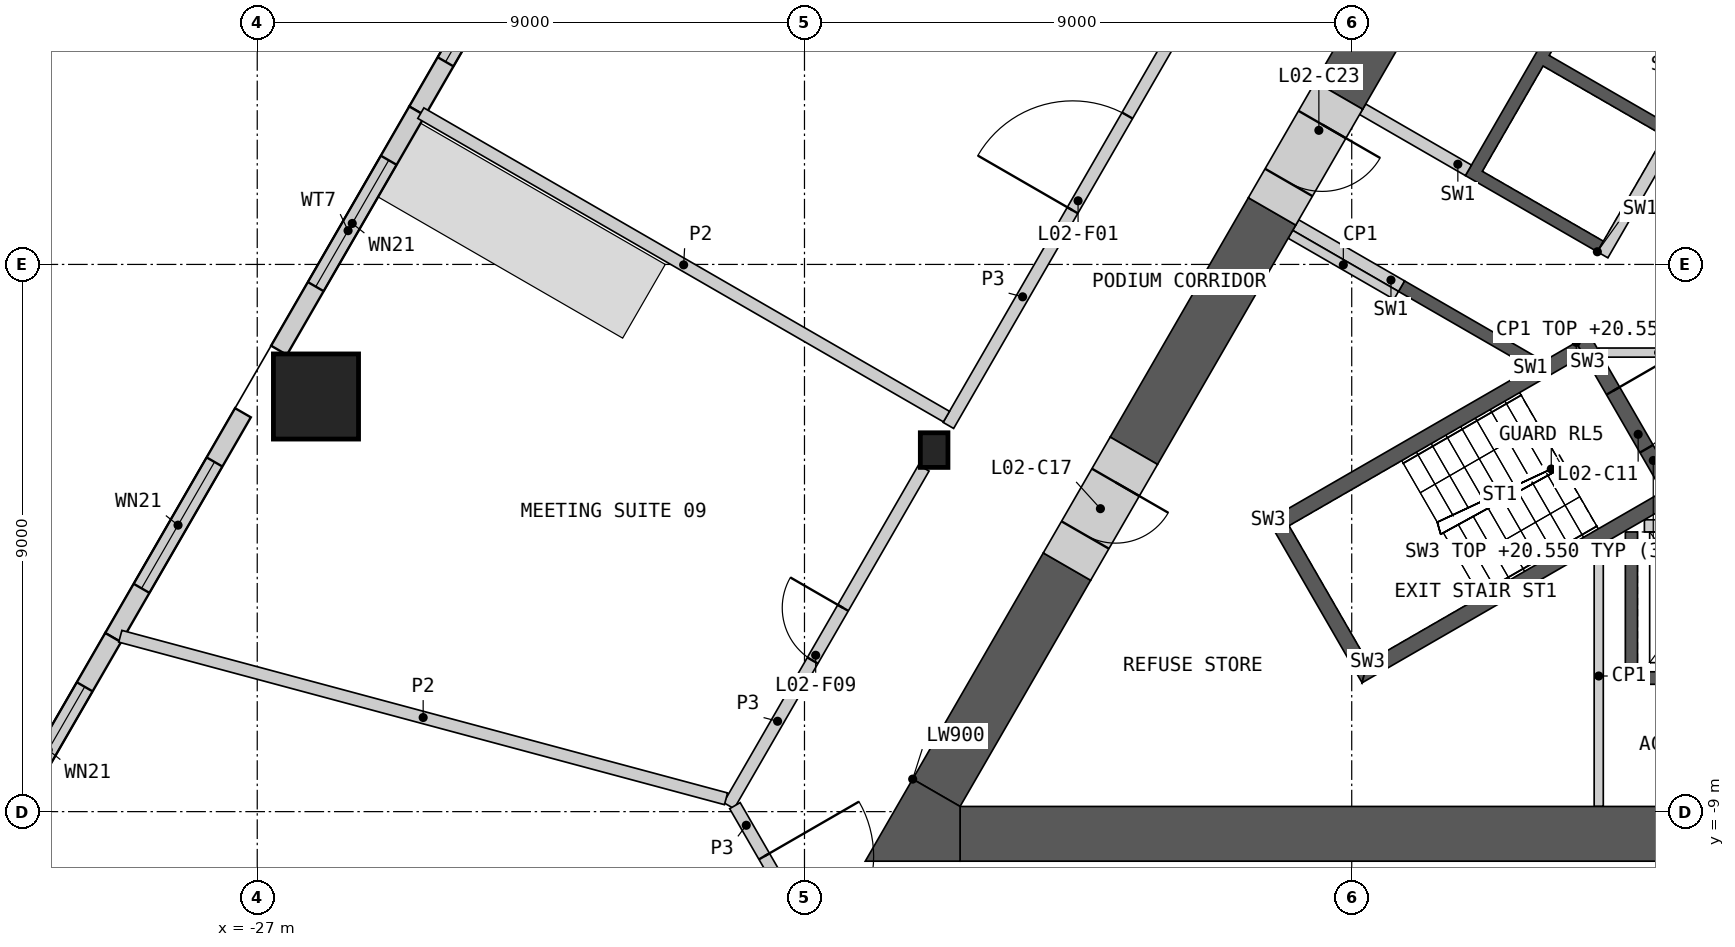
"""IFC4 building model, lengths in metres.
Left out: names, types, materials, properties, quantities, classifications, styles, units other than length and angle.
Written with IfcOpenShell. Run it as: python <this file> out.ifc"""

import sys

from ifc_helpers import new_model, si_unit, direction, frame, frame_2d, origin, origin_2d, place, context, subcontext, project, spatial, polyline, rectangle, hollow_rectangle, i_section, outline, extrude, element, fill, save


model = new_model("IFC4")
c1 = context("Model", 3, precision=1e-05, world=origin(), true_north=direction((0.0, 1.0)))
c2 = subcontext(c1, "Body", "Model", "MODEL_VIEW")
j1 = project(units=[si_unit("LENGTHUNIT", "METRE"), si_unit("PLANEANGLEUNIT", "RADIAN")], contexts=[c1])
p1 = place(None, origin())
s1 = spatial("IfcSite", under=j1, at=p1, CompositionType="ELEMENT")
p2 = place(p1, origin())
s2 = spatial("IfcBuilding", under=s1, at=p2, CompositionType="ELEMENT")
p3 = place(p2, frame((0.0, 0.0, 15.5)))
s3 = spatial("IfcBuildingStorey", under=s2, at=p3, CompositionType="ELEMENT", Elevation=15.5)
p4 = place(p3, frame((-26.034, -2.172, 0.0), z_axis=(0.0, 0.0, 1.0), x_axis=(1.0, 0.0, 0.0)))
e1 = element("IfcColumn", 1, at=p4, inside=s3, PredefinedType="COLUMN", context=c2, shape_type="SweptSolid", body=[
    extrude(hollow_rectangle(XDim=1.4, YDim=1.4, WallThickness=0.1, at=origin_2d()), origin(), (0.0, 0.0, 1.0), 5.5),
])
p5 = place(p3, frame((-15.868, -3.054, 0.0), z_axis=(0.0, 0.0, 1.0), x_axis=(1.0, 0.0, 0.0)))
e2 = element("IfcColumn", 2, at=p5, inside=s3, PredefinedType="COLUMN", context=c2, shape_type="SweptSolid", body=[
    extrude(i_section(OverallWidth=0.454, OverallDepth=0.57, WebThickness=0.078, FlangeThickness=0.125, at=origin_2d()), origin(), (0.0, 0.0, 1.0), 5.5),
])
p6 = place(p3, frame((-22.235, 6.221, 0.0), z_axis=(0.0, 0.0, 1.0), x_axis=(-0.500019418418, -0.866014192265, 0.0)))
e3 = element("IfcWall", 3, at=p6, inside=s3, PredefinedType="SOLIDWALL", context=c2, shape_type="SweptSolid", body=[
    extrude(rectangle(XDim=4.27, YDim=0.3, at=frame_2d((2.135, 0.0))), origin(), (0.0, 0.0, 1.0), 5.05),
])
p7 = place(p6, frame((0.935, 0.0, 0.9)))
e4 = element("IfcOpeningElement", 4, at=p7, cuts=e3, PredefinedType="OPENING", context=c2, shape_type="SweptSolid", body=[
    extrude(rectangle(XDim=2.4, YDim=3.0, at=frame_2d((1.2, 1.5))), frame((0.0, 0.16, 0.0), z_axis=(0.0, -1.0, 0.0), x_axis=(1.0, 0.0, 0.0)), (0.0, 0.0, 1.0), 0.32),
])
p8 = place(p3, frame((-24.37, 2.523, 0.0), z_axis=(0.0, 0.0, 1.0), x_axis=(-0.499964285679, -0.866046022475, 0.0)))
e5 = element("IfcWall", 5, at=p8, inside=s3, PredefinedType="SOLIDWALL", context=c2, shape_type="SweptSolid", body=[
    extrude(rectangle(XDim=4.544, YDim=0.3, at=frame_2d((2.272, 0.0))), origin(), (0.0, 0.0, 1.0), 5.05),
])
p9 = place(p8, frame((0.935, 0.0, 0.9)))
e6 = element("IfcOpeningElement", 6, at=p9, cuts=e5, PredefinedType="OPENING", context=c2, shape_type="SweptSolid", body=[
    extrude(rectangle(XDim=2.4, YDim=3.0, at=frame_2d((1.2, 1.5))), frame((0.0, 0.16, 0.0), z_axis=(0.0, -1.0, 0.0), x_axis=(1.0, 0.0, 0.0)), (0.0, 0.0, 1.0), 0.32),
])
p10 = place(p3, frame((-27.235, -2.439, 0.0), z_axis=(0.0, 0.0, 1.0), x_axis=(-0.499994660107, -0.866028486751, 0.0)))
e7 = element("IfcWall", 7, at=p10, inside=s3, PredefinedType="SOLIDWALL", context=c2, shape_type="SweptSolid", body=[
    extrude(rectangle(XDim=4.27, YDim=0.3, at=frame_2d((2.135, 0.0))), origin(), (0.0, 0.0, 1.0), 5.05),
])
p11 = place(p10, frame((0.935, 0.0, 0.9)))
e8 = element("IfcOpeningElement", 8, at=p11, cuts=e7, PredefinedType="OPENING", context=c2, shape_type="SweptSolid", body=[
    extrude(rectangle(XDim=2.4, YDim=3.0, at=frame_2d((1.2, 1.5))), frame((0.0, 0.16, 0.0), z_axis=(0.0, -1.0, 0.0), x_axis=(1.0, 0.0, 0.0)), (0.0, 0.0, 1.0), 0.32),
])
p12 = place(p3, frame((-29.37, -6.137, 0.0), z_axis=(0.0, 0.0, 1.0), x_axis=(-0.49999314502, -0.866029361473, 0.0)))
e9 = element("IfcWall", 9, at=p12, inside=s3, PredefinedType="SOLIDWALL", context=c2, shape_type="SweptSolid", body=[
    extrude(rectangle(XDim=4.476, YDim=0.3, at=frame_2d((2.238, 0.0))), origin(), (0.0, 0.0, 1.0), 5.05),
])
p13 = place(p12, frame((0.935, 0.0, 0.9)))
e10 = element("IfcOpeningElement", 10, at=p13, cuts=e9, PredefinedType="OPENING", context=c2, shape_type="SweptSolid", body=[
    extrude(rectangle(XDim=2.4, YDim=3.0, at=frame_2d((1.2, 1.5))), frame((0.0, 0.16, 0.0), z_axis=(0.0, -1.0, 0.0), x_axis=(1.0, 0.0, 0.0)), (0.0, 0.0, 1.0), 0.32),
])
p14 = place(p3, origin())
e11 = element("IfcWall", 11, at=p14, inside=s3, PredefinedType="SHEAR", context=c2, shape_type="SweptSolid", body=[
    extrude(outline(polyline([(4.5, -4.4), (4.5, -6.906), (-4.5, -6.906), (-4.5, -4.4), (-4.3, -4.4), (-4.3, -6.7), (-2.3, -6.7), (-2.3, -4.4), (-2.1, -4.4), (-2.1, -6.7), (-0.1, -6.7), (-0.1, -4.4), (0.1, -4.4), (0.1, -6.7), (2.1, -6.7), (2.1, -4.4), (2.3, -4.4), (2.3, -6.7), (4.3, -6.7), (4.3, -4.4), (4.5, -4.4)])), origin(), (0.0, 0.0, 1.0), 5.05),
])
p15 = place(p3, frame((-4.187, -4.3, 0.0), z_axis=(0.0, 0.0, 1.0), x_axis=(1.0, 0.0, 0.0)))
e12 = element("IfcWall", 12, at=p15, inside=s3, PredefinedType="SOLIDWALL", context=c2, shape_type="SweptSolid", body=[
    extrude(rectangle(XDim=8.373, YDim=0.2, at=frame_2d((4.187, 0.0))), origin(), (0.0, 0.0, 1.0), 5.05),
])
p16 = place(p15, frame((0.287, 0.0, 0.0)))
e13 = element("IfcOpeningElement", 13, at=p16, cuts=e12, PredefinedType="OPENING", context=c2, shape_type="SweptSolid", body=[
    extrude(rectangle(XDim=1.2, YDim=2.1, at=frame_2d((0.6, 1.05))), frame((0.0, 0.11, 0.0), z_axis=(0.0, -1.0, 0.0), x_axis=(1.0, 0.0, 0.0)), (0.0, 0.0, 1.0), 0.22),
])
p17 = place(p15, frame((2.387, 0.0, 0.0)))
e14 = element("IfcOpeningElement", 14, at=p17, cuts=e12, PredefinedType="OPENING", context=c2, shape_type="SweptSolid", body=[
    extrude(rectangle(XDim=1.4, YDim=2.1, at=frame_2d((0.7, 1.05))), frame((0.0, 0.11, 0.0), z_axis=(0.0, -1.0, 0.0), x_axis=(1.0, 0.0, 0.0)), (0.0, 0.0, 1.0), 0.22),
])
p18 = place(p15, frame((4.737, 0.0, 0.0)))
e15 = element("IfcOpeningElement", 15, at=p18, cuts=e12, PredefinedType="OPENING", context=c2, shape_type="SweptSolid", body=[
    extrude(rectangle(XDim=1.1, YDim=2.1, at=frame_2d((0.55, 1.05))), frame((0.0, 0.11, 0.0), z_axis=(0.0, -1.0, 0.0), x_axis=(1.0, 0.0, 0.0)), (0.0, 0.0, 1.0), 0.22),
])
p19 = place(p15, frame((6.887, 0.0, 0.0)))
e16 = element("IfcOpeningElement", 16, at=p19, cuts=e12, PredefinedType="OPENING", context=c2, shape_type="SweptSolid", body=[
    extrude(rectangle(XDim=1.2, YDim=2.1, at=frame_2d((0.6, 1.05))), frame((0.0, 0.11, 0.0), z_axis=(0.0, -1.0, 0.0), x_axis=(1.0, 0.0, 0.0)), (0.0, 0.0, 1.0), 0.22),
])
p20 = place(p3, origin())
e17 = element("IfcWall", 17, at=p20, inside=s3, PredefinedType="SHEAR", context=c2, shape_type="SweptSolid", body=[
    extrude(outline(polyline([(-6.061, -1.697), (-8.231, -0.444), (-8.131, -0.271), (-5.96, -1.524), (-6.061, -1.697)])), origin(), (0.0, 0.0, 1.0), 5.05),
])
p21 = place(p3, origin())
e18 = element("IfcWall", 18, at=p21, inside=s3, PredefinedType="SHEAR", context=c2, shape_type="SweptSolid", body=[
    extrude(outline(polyline([(-4.96, 0.208), (-7.131, 1.461), (-3.731, 7.35), (-1.561, 6.097), (-1.66, 5.924), (-3.652, 7.074), (-5.752, 3.437), (-3.76, 2.287), (-3.861, 2.113), (-5.852, 3.263), (-6.852, 1.531), (-4.861, 0.381), (-4.96, 0.208)])), origin(), (0.0, 0.0, 1.0), 5.05),
])
p22 = place(p3, frame((-1.631, 5.776, 0.0), z_axis=(0.0, 0.0, 1.0), x_axis=(-0.499992876559, -0.866029516466, 0.0)))
e19 = element("IfcWall", 19, at=p22, inside=s3, PredefinedType="SOLIDWALL", context=c2, shape_type="SweptSolid", body=[
    extrude(rectangle(XDim=6.486, YDim=0.2, at=frame_2d((3.243, 0.0))), origin(), (0.0, 0.0, 1.0), 5.05),
])
p23 = place(p22, frame((1.537, 0.0, 0.0)))
e20 = element("IfcOpeningElement", 20, at=p23, cuts=e19, PredefinedType="OPENING", context=c2, shape_type="SweptSolid", body=[
    extrude(rectangle(XDim=0.9, YDim=2.1, at=frame_2d((0.45, 1.05))), frame((0.0, 0.11, 0.0), z_axis=(0.0, -1.0, 0.0), x_axis=(1.0, 0.0, 0.0)), (0.0, 0.0, 1.0), 0.22),
])
p24 = place(p3, frame((-7.081, 1.548, 0.0), z_axis=(0.0, 0.0, 1.0), x_axis=(-0.865983199114, 0.50007309351, 0.0)))
e21 = element("IfcWall", 21, at=p24, inside=s3, PredefinedType="SHEAR", context=c2, shape_type="SweptSolid", body=[
    extrude(rectangle(XDim=2.009, YDim=0.2, at=frame_2d((1.004, 0.0))), origin(), (0.0, 0.0, 1.0), 5.05),
])
p25 = place(p3, frame((-8.181, -0.357, 0.0), z_axis=(0.0, 0.0, 1.0), x_axis=(-0.866035824272, 0.499981950752, 0.0)))
e22 = element("IfcWall", 22, at=p25, inside=s3, PredefinedType="SHEAR", context=c2, shape_type="SweptSolid", body=[
    extrude(rectangle(XDim=2.009, YDim=0.2, at=frame_2d((1.004, 0.0))), origin(), (0.0, 0.0, 1.0), 5.05),
])
p26 = place(p3, frame((-4.941, -1.45, 0.0), z_axis=(0.0, 0.0, 1.0), x_axis=(1.0, 0.0, 0.0)))
e23 = element("IfcWall", 23, at=p26, inside=s3, PredefinedType="PARTITIONING", context=c2, shape_type="SweptSolid", body=[
    extrude(rectangle(XDim=9.882, YDim=0.15, at=frame_2d((4.941, 0.0))), origin(), (0.0, 0.0, 1.0), 5.05),
])
p27 = place(p26, frame((4.391, 0.0, 0.0)))
e24 = element("IfcOpeningElement", 24, at=p27, cuts=e23, PredefinedType="OPENING", context=c2, shape_type="SweptSolid", body=[
    extrude(rectangle(XDim=1.1, YDim=2.1, at=frame_2d((0.55, 1.05))), frame((0.0, 0.085, 0.0), z_axis=(0.0, -1.0, 0.0), x_axis=(1.0, 0.0, 0.0)), (0.0, 0.0, 1.0), 0.17),
])
p28 = place(p3, origin())
e25 = element("IfcWall", 25, at=p28, inside=s3, PredefinedType="SHEAR", context=c2, shape_type="SweptSolid", body=[
    extrude(outline(polyline([(-5.307, -1.281), (-10.374, -4.206), (-10.032, -4.298), (-5.182, -1.498), (-5.307, -1.281)])), origin(), (0.0, 0.0, 1.0), 5.05),
])
p29 = place(p3, origin())
e26 = element("IfcWall", 26, at=p29, inside=s3, PredefinedType="SHEAR", context=c2, shape_type="SweptSolid", body=[
    extrude(outline(polyline([(-10.374, -4.206), (-8.83, -6.881), (-8.738, -6.539), (-10.032, -4.298), (-10.374, -4.206)])), origin(), (0.0, 0.0, 1.0), 5.05),
])
p30 = place(p3, origin())
e27 = element("IfcWall", 27, at=p30, inside=s3, PredefinedType="SHEAR", context=c2, shape_type="SweptSolid", body=[
    extrude(outline(polyline([(-8.738, -6.539), (-8.83, -6.881), (-3.763, -3.956), (-3.888, -3.739), (-8.738, -6.539)])), origin(), (0.0, 0.0, 1.0), 5.05),
])
p31 = place(p3, frame((-5.199, -1.219, 0.0), z_axis=(0.0, 0.0, 1.0), x_axis=(0.499982516597, -0.866035497597, 0.0)))
e28 = element("IfcWall", 28, at=p31, inside=s3, PredefinedType="SHEAR", context=c2, shape_type="SweptSolid", body=[
    extrude(rectangle(XDim=3.088, YDim=0.25, at=frame_2d((1.544, 0.0))), origin(), (0.0, 0.0, 1.0), 5.05),
])
p32 = place(p31, frame((0.994, 0.0, 0.0)))
e29 = element("IfcOpeningElement", 29, at=p32, cuts=e28, PredefinedType="OPENING", context=c2, shape_type="SweptSolid", body=[
    extrude(rectangle(XDim=1.1, YDim=2.1, at=frame_2d((0.55, 1.05))), frame((0.0, 0.135, 0.0), z_axis=(0.0, -1.0, 0.0), x_axis=(1.0, 0.0, 0.0)), (0.0, 0.0, 1.0), 0.27),
])
p33 = place(p3, frame((-8.268, -0.509, 0.0), z_axis=(0.0, 0.0, 1.0), x_axis=(-0.866035824272, 0.499981950752, 0.0)))
e30 = element("IfcWall", 30, at=p33, inside=s3, PredefinedType="PARTITIONING", context=c2, shape_type="SweptSolid", body=[
    extrude(rectangle(XDim=2.009, YDim=0.15, at=frame_2d((1.004, 0.0))), origin(), (0.0, 0.0, 1.0), 5.05),
])
p34 = place(p3, frame((-4.938, -8.915, 0.0), z_axis=(0.0, 0.0, 1.0), x_axis=(0.0, 1.0, 0.0)))
e31 = element("IfcWall", 31, at=p34, inside=s3, PredefinedType="PARTITIONING", context=c2, shape_type="SweptSolid", body=[
    extrude(rectangle(XDim=4.291, YDim=0.15, at=frame_2d((2.146, 0.0))), origin(), (0.0, 0.0, 1.0), 5.05),
])
p35 = place(p3, frame((-15.441, -9.365, 0.0), z_axis=(0.0, 0.0, 1.0), x_axis=(1.0, 0.0, 0.0)))
e32 = element("IfcWall", 32, at=p35, inside=s3, PredefinedType="SHEAR", context=c2, shape_type="SweptSolid", body=[
    extrude(rectangle(XDim=11.692, YDim=0.9, at=frame_2d((5.846, 0.0))), origin(), (0.0, 0.0, 1.0), 5.05),
])
p36 = place(p3, frame((-10.31, 0.872, 0.0), z_axis=(0.0, 0.0, 1.0), x_axis=(-0.499968858743, -0.866043382451, 0.0)))
e33 = element("IfcWall", 33, at=p36, inside=s3, PredefinedType="SHEAR", context=c2, shape_type="SweptSolid", body=[
    extrude(rectangle(XDim=4.546, YDim=0.9, at=frame_2d((2.273, 0.0))), origin(), (0.0, 0.0, 1.0), 5.05),
])
p37 = place(p3, frame((-13.683, -4.97, 0.0), z_axis=(0.0, 0.0, 1.0), x_axis=(-0.499996331799, -0.866027521611, 0.0)))
e34 = element("IfcWall", 34, at=p37, inside=s3, PredefinedType="SHEAR", context=c2, shape_type="SweptSolid", body=[
    extrude(rectangle(XDim=4.295, YDim=0.9, at=frame_2d((2.148, 0.0))), origin(), (0.0, 0.0, 1.0), 5.05),
])
p38 = place(p3, frame((-8.06, 4.769, 0.0), z_axis=(0.0, 0.0, 1.0), x_axis=(-0.499952165731, -0.866053019151, 0.0)))
e35 = element("IfcWall", 35, at=p38, inside=s3, PredefinedType="SHEAR", context=c2, shape_type="SweptSolid", body=[
    extrude(rectangle(XDim=2.3, YDim=0.9, at=frame_2d((1.15, 0.0))), origin(), (0.0, 0.0, 1.0), 5.05),
])
p39 = place(p3, origin())
e36 = element("IfcWall", 36, at=p39, inside=s3, PredefinedType="SHEAR", context=c2, shape_type="SweptSolid", body=[
    extrude(outline(polyline([(-16.221, -8.465), (-15.441, -8.915), (-15.441, -9.815), (-17.0, -9.815), (-16.221, -8.465)])), origin(), (0.0, 0.0, 1.0), 5.05),
])
p40 = place(p3, frame((-12.583, -3.065, 0.0), z_axis=(0.0, 0.0, 1.0), x_axis=(-0.50002983664, -0.866008176907, 0.0)))
e37 = element("IfcWall", 37, at=p40, inside=s3, PredefinedType="SHEAR", context=c2, shape_type="SweptSolid", body=[
    extrude(rectangle(XDim=2.2, YDim=0.9, at=frame_2d((1.1, 0.0))), origin(), (0.0, 0.0, 1.0), 5.05),
])
p41 = place(p40, frame((0.6, 0.0, 0.0)))
e38 = element("IfcOpeningElement", 38, at=p41, cuts=e37, PredefinedType="OPENING", context=c2, shape_type="SweptSolid", body=[
    extrude(rectangle(XDim=1.0, YDim=2.1, at=frame_2d((0.5, 1.05))), frame((0.0, 0.46, 0.0), z_axis=(0.0, -1.0, 0.0), x_axis=(1.0, 0.0, 0.0)), (0.0, 0.0, 1.0), 0.92),
])
p42 = place(p3, frame((-9.21, 2.777, 0.0), z_axis=(0.0, 0.0, 1.0), x_axis=(-0.500077893725, -0.86598042715, 0.0)))
e39 = element("IfcWall", 39, at=p42, inside=s3, PredefinedType="SHEAR", context=c2, shape_type="SweptSolid", body=[
    extrude(rectangle(XDim=2.2, YDim=0.9, at=frame_2d((1.1, 0.0))), origin(), (0.0, 0.0, 1.0), 5.05),
])
p43 = place(p42, frame((0.55, 0.0, 0.0)))
e40 = element("IfcOpeningElement", 40, at=p43, cuts=e39, PredefinedType="OPENING", context=c2, shape_type="SweptSolid", body=[
    extrude(rectangle(XDim=1.1, YDim=2.1, at=frame_2d((0.55, 1.05))), frame((0.0, 0.46, 0.0), z_axis=(0.0, -1.0, 0.0), x_axis=(1.0, 0.0, 0.0)), (0.0, 0.0, 1.0), 0.92),
])
p44 = place(p3, frame((-15.634, -2.648, 0.0), z_axis=(0.0, 0.0, 1.0), x_axis=(0.500017363087, 0.866015378969, 0.0)))
e41 = element("IfcWall", 41, at=p44, inside=s3, PredefinedType="PARTITIONING", context=c2, shape_type="SweptSolid", body=[
    extrude(rectangle(XDim=9.77, YDim=0.2, at=frame_2d((4.885, 0.0))), origin(), (0.0, 0.0, 1.0), 5.05),
])
p45 = place(p44, frame((4.086, 0.0, 0.0)))
e42 = element("IfcOpeningElement", 42, at=p45, cuts=e41, PredefinedType="OPENING", context=c2, shape_type="SweptSolid", body=[
    extrude(rectangle(XDim=1.8, YDim=2.1, at=frame_2d((0.9, 1.05))), frame((0.0, 0.11, 0.0), z_axis=(0.0, -1.0, 0.0), x_axis=(1.0, 0.0, 0.0)), (0.0, 0.0, 1.0), 0.22),
])
p46 = place(p3, frame((-19.244, -8.902, 0.0), z_axis=(0.0, 0.0, 1.0), x_axis=(0.499988314375, 0.866032150378, 0.0)))
e43 = element("IfcWall", 43, at=p46, inside=s3, PredefinedType="PARTITIONING", context=c2, shape_type="SweptSolid", body=[
    extrude(rectangle(XDim=6.412, YDim=0.2, at=frame_2d((3.206, 0.0))), origin(), (0.0, 0.0, 1.0), 5.05),
])
p47 = place(p46, frame((2.756, 0.0, 0.0)))
e44 = element("IfcOpeningElement", 44, at=p47, cuts=e43, PredefinedType="OPENING", context=c2, shape_type="SweptSolid", body=[
    extrude(rectangle(XDim=1.0, YDim=2.1, at=frame_2d((0.5, 1.05))), frame((0.0, 0.11, 0.0), z_axis=(0.0, -1.0, 0.0), x_axis=(1.0, 0.0, 0.0)), (0.0, 0.0, 1.0), 0.22),
])
p48 = place(p3, frame((-19.144, -8.902, 0.0), z_axis=(0.0, 0.0, 1.0), x_axis=(0.499958791762, -0.866049194065, 0.0)))
e45 = element("IfcWall", 45, at=p48, inside=s3, PredefinedType="PARTITIONING", context=c2, shape_type="SweptSolid", body=[
    extrude(rectangle(XDim=3.726, YDim=0.2, at=frame_2d((1.863, 0.0))), origin(), (0.0, 0.0, 1.0), 5.05),
])
p49 = place(p48, frame((0.963, 0.0, 0.0)))
e46 = element("IfcOpeningElement", 46, at=p49, cuts=e45, PredefinedType="OPENING", context=c2, shape_type="SweptSolid", body=[
    extrude(rectangle(XDim=1.8, YDim=2.1, at=frame_2d((0.9, 1.05))), frame((0.0, 0.11, 0.0), z_axis=(0.0, -1.0, 0.0), x_axis=(1.0, 0.0, 0.0)), (0.0, 0.0, 1.0), 0.22),
])
p50 = place(p3, frame((-29.252, -6.115, 0.0), z_axis=(0.0, 0.0, 1.0), x_axis=(0.965818413341, -0.259219583464, 0.0)))
e47 = element("IfcWall", 47, at=p50, inside=s3, PredefinedType="PARTITIONING", context=c2, shape_type="SweptSolid", body=[
    extrude(rectangle(XDim=10.314, YDim=0.2, at=frame_2d((5.157, 0.0))), origin(), (0.0, 0.0, 1.0), 5.05),
])
p51 = place(p3, frame((-24.31, 2.488, 0.0), z_axis=(0.0, 0.0, 1.0), x_axis=(0.866034070548, -0.499984988425, 0.0)))
e48 = element("IfcWall", 48, at=p51, inside=s3, PredefinedType="PARTITIONING", context=c2, shape_type="SweptSolid", body=[
    extrude(rectangle(XDim=9.982, YDim=0.2, at=frame_2d((4.991, 0.0))), origin(), (0.0, 0.0, 1.0), 5.05),
])
p52 = place(p7, origin())
e49 = element("IfcWindow", 49, at=p52, inside=s3, PartitioningType="SINGLE_PANEL", PredefinedType="WINDOW", context=c2, shape_type="SweptSolid", body=[
    extrude(rectangle(XDim=2.4, YDim=3.0, at=frame_2d((1.2, 1.5))), frame((0.0, 0.03, 0.0), z_axis=(0.0, -1.0, 0.0), x_axis=(1.0, 0.0, 0.0)), (0.0, 0.0, 1.0), 0.06),
])
fill(e4, e49)
p53 = place(p9, origin())
e50 = element("IfcWindow", 50, at=p53, inside=s3, PartitioningType="SINGLE_PANEL", PredefinedType="WINDOW", context=c2, shape_type="SweptSolid", body=[
    extrude(rectangle(XDim=2.4, YDim=3.0, at=frame_2d((1.2, 1.5))), frame((0.0, 0.03, 0.0), z_axis=(0.0, -1.0, 0.0), x_axis=(1.0, 0.0, 0.0)), (0.0, 0.0, 1.0), 0.06),
])
fill(e6, e50)
p54 = place(p11, origin())
e51 = element("IfcWindow", 51, at=p54, inside=s3, PartitioningType="SINGLE_PANEL", PredefinedType="WINDOW", context=c2, shape_type="SweptSolid", body=[
    extrude(rectangle(XDim=2.4, YDim=3.0, at=frame_2d((1.2, 1.5))), frame((0.0, 0.03, 0.0), z_axis=(0.0, -1.0, 0.0), x_axis=(1.0, 0.0, 0.0)), (0.0, 0.0, 1.0), 0.06),
])
fill(e8, e51)
p55 = place(p13, origin())
e52 = element("IfcWindow", 52, at=p55, inside=s3, PartitioningType="SINGLE_PANEL", PredefinedType="WINDOW", context=c2, shape_type="SweptSolid", body=[
    extrude(rectangle(XDim=2.4, YDim=3.0, at=frame_2d((1.2, 1.5))), frame((0.0, 0.03, 0.0), z_axis=(0.0, -1.0, 0.0), x_axis=(1.0, 0.0, 0.0)), (0.0, 0.0, 1.0), 0.06),
])
fill(e10, e52)
p56 = place(p32, origin())
e53 = element("IfcDoor", 53, at=p56, inside=s3, OperationType="SINGLE_SWING_LEFT", PredefinedType="DOOR", context=c2, shape_type="SweptSolid", body=[
    extrude(rectangle(XDim=1.1, YDim=2.1, at=frame_2d((0.55, 1.05))), frame((0.0, 0.025, 0.0), z_axis=(0.0, -1.0, 0.0), x_axis=(1.0, 0.0, 0.0)), (0.0, 0.0, 1.0), 0.05),
])
fill(e29, e53)
p57 = place(p41, origin())
e54 = element("IfcDoor", 54, at=p57, inside=s3, OperationType="SINGLE_SWING_LEFT", PredefinedType="DOOR", context=c2, shape_type="SweptSolid", body=[
    extrude(rectangle(XDim=1.0, YDim=2.1, at=frame_2d((0.5, 1.05))), frame((0.0, 0.205, 0.0), z_axis=(0.0, -1.0, 0.0), x_axis=(1.0, 0.0, 0.0)), (0.0, 0.0, 1.0), 0.05),
])
fill(e38, e54)
p58 = place(p43, origin())
e55 = element("IfcDoor", 55, at=p58, inside=s3, OperationType="SINGLE_SWING_LEFT", PredefinedType="DOOR", context=c2, shape_type="SweptSolid", body=[
    extrude(rectangle(XDim=1.1, YDim=2.1, at=frame_2d((0.55, 1.05))), frame((0.0, 0.205, 0.0), z_axis=(0.0, -1.0, 0.0), x_axis=(1.0, 0.0, 0.0)), (0.0, 0.0, 1.0), 0.05),
])
fill(e40, e55)
p59 = place(p45, origin())
e56 = element("IfcDoor", 56, at=p59, inside=s3, OperationType="DOUBLE_DOOR_SINGLE_SWING", PredefinedType="DOOR", context=c2, shape_type="SweptSolid", body=[
    extrude(rectangle(XDim=1.8, YDim=2.1, at=frame_2d((0.9, 1.05))), frame((0.0, 0.025, 0.0), z_axis=(0.0, -1.0, 0.0), x_axis=(1.0, 0.0, 0.0)), (0.0, 0.0, 1.0), 0.05),
])
fill(e42, e56)
p60 = place(p47, origin())
e57 = element("IfcDoor", 57, at=p60, inside=s3, OperationType="SINGLE_SWING_RIGHT", PredefinedType="DOOR", context=c2, shape_type="SweptSolid", body=[
    extrude(rectangle(XDim=1.0, YDim=2.1, at=frame_2d((0.5, 1.05))), frame((0.0, 0.025, 0.0), z_axis=(0.0, -1.0, 0.0), x_axis=(1.0, 0.0, 0.0)), (0.0, 0.0, 1.0), 0.05),
])
fill(e44, e57)
p61 = place(p49, origin())
e58 = element("IfcDoor", 58, at=p61, inside=s3, OperationType="DOUBLE_DOOR_SINGLE_SWING", PredefinedType="DOOR", context=c2, shape_type="SweptSolid", body=[
    extrude(rectangle(XDim=1.8, YDim=2.1, at=frame_2d((0.9, 1.05))), frame((0.0, 0.025, 0.0), z_axis=(0.0, -1.0, 0.0), x_axis=(1.0, 0.0, 0.0)), (0.0, 0.0, 1.0), 0.05),
])
fill(e46, e58)
save(model, sys.argv[1])
